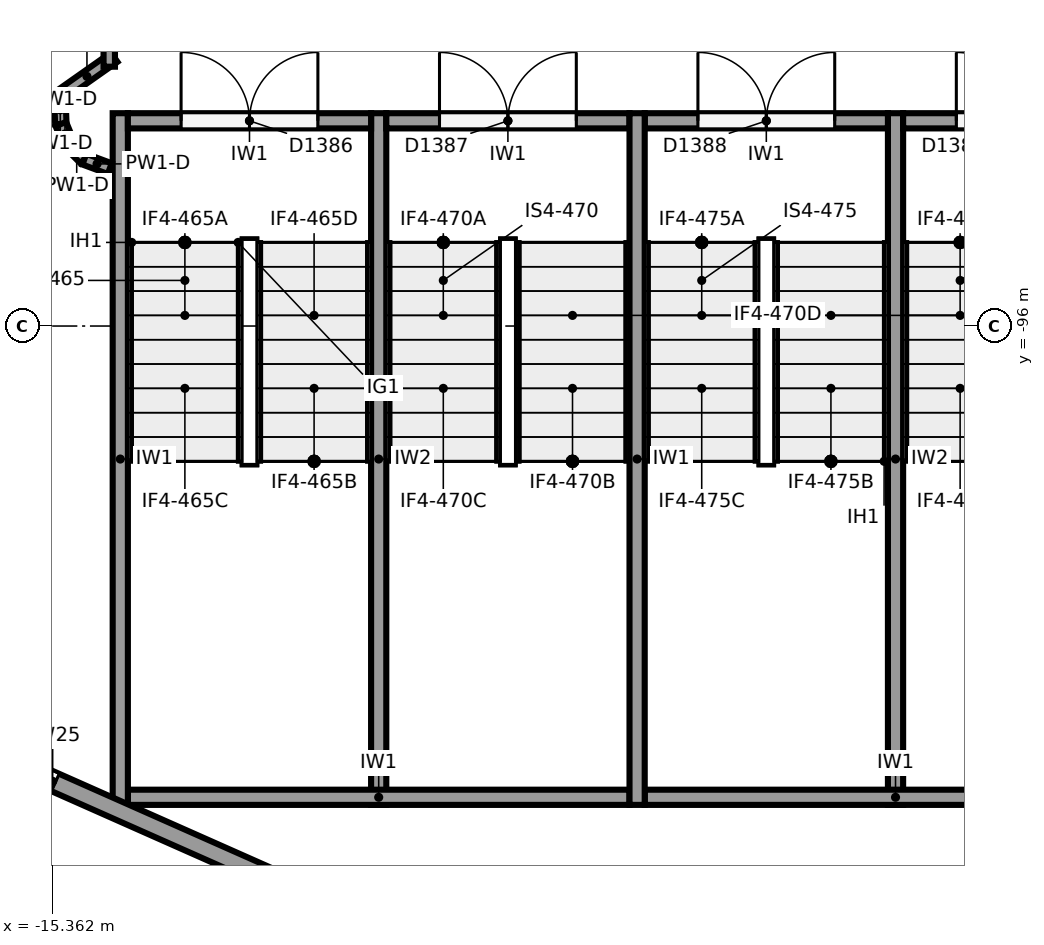
"""IFC4 building model, lengths in metres.
Left out: names, types, materials, properties, quantities, classifications, styles, units other than length and angle.
Written with IfcOpenShell. Run it as: python <this file> out.ifc"""

import sys

from ifc_helpers import new_model, si_unit, direction, frame, frame_2d, origin, place, context, subcontext, project, spatial, rectangle, extrude, element, fill, save


model = new_model("IFC4")
c1 = context("Model", 3, precision=1e-05, world=origin(), true_north=direction((0.0, 1.0)))
c2 = subcontext(c1, "Body", "Model", "MODEL_VIEW")
j1 = project(units=[si_unit("LENGTHUNIT", "METRE"), si_unit("PLANEANGLEUNIT", "RADIAN")], contexts=[c1])
p1 = place(None, origin())
s1 = spatial("IfcSite", under=j1, at=p1, CompositionType="ELEMENT")
p2 = place(p1, origin())
s2 = spatial("IfcBuilding", under=s1, at=p2, CompositionType="ELEMENT")
p3 = place(p2, frame((0.0, 0.0, 18.0)))
s3 = spatial("IfcBuildingStorey", under=s2, at=p3, CompositionType="ELEMENT", Elevation=18.0)
p4 = place(p3, frame((-8.123, -105.198, 0.0), z_axis=(0.0, 0.0, 1.0), x_axis=(-0.914138897099, 0.405401130748, 0.0)))
e1 = element("IfcWall", 1, at=p4, inside=s3, PredefinedType="SOLIDWALL", context=c2, shape_type="SweptSolid", body=[
    extrude(rectangle(XDim=15.824, YDim=0.25, at=frame_2d((7.912, 0.0))), origin(), (0.0, 0.0, 1.0), 4.3),
])
p5 = place(p4, frame((14.174, 0.0, 1.0)))
e2 = element("IfcOpeningElement", 2, at=p5, cuts=e1, PredefinedType="OPENING", context=c2, shape_type="SweptSolid", body=[
    extrude(rectangle(XDim=0.9, YDim=3.25, at=frame_2d((0.45, 1.625))), frame((0.0, 0.135, 0.0), z_axis=(0.0, -1.0, 0.0), x_axis=(1.0, 0.0, 0.0)), (0.0, 0.0, 1.0), 0.27),
])
p6 = place(p4, frame((12.074, 0.0, 1.0)))
e3 = element("IfcOpeningElement", 3, at=p6, cuts=e1, PredefinedType="OPENING", context=c2, shape_type="SweptSolid", body=[
    extrude(rectangle(XDim=0.9, YDim=3.25, at=frame_2d((0.45, 1.625))), frame((0.0, 0.135, 0.0), z_axis=(0.0, -1.0, 0.0), x_axis=(1.0, 0.0, 0.0)), (0.0, 0.0, 1.0), 0.27),
])
p7 = place(p4, frame((9.974, 0.0, 1.0)))
e4 = element("IfcOpeningElement", 4, at=p7, cuts=e1, PredefinedType="OPENING", context=c2, shape_type="SweptSolid", body=[
    extrude(rectangle(XDim=0.9, YDim=3.25, at=frame_2d((0.45, 1.625))), frame((0.0, 0.135, 0.0), z_axis=(0.0, -1.0, 0.0), x_axis=(1.0, 0.0, 0.0)), (0.0, 0.0, 1.0), 0.27),
])
p8 = place(p4, frame((7.874, 0.0, 1.0)))
e5 = element("IfcOpeningElement", 5, at=p8, cuts=e1, PredefinedType="OPENING", context=c2, shape_type="SweptSolid", body=[
    extrude(rectangle(XDim=0.9, YDim=3.25, at=frame_2d((0.45, 1.625))), frame((0.0, 0.135, 0.0), z_axis=(0.0, -1.0, 0.0), x_axis=(1.0, 0.0, 0.0)), (0.0, 0.0, 1.0), 0.27),
])
p9 = place(p3, frame((7.256, -98.782, 0.0), z_axis=(0.0, 0.0, 1.0), x_axis=(-0.914136361455, -0.405406848322, 0.0)))
e6 = element("IfcWall", 6, at=p9, inside=s3, PredefinedType="SOLIDWALL", context=c2, shape_type="SweptSolid", body=[
    extrude(rectangle(XDim=15.824, YDim=0.25, at=frame_2d((7.912, 0.0))), origin(), (0.0, 0.0, 1.0), 4.3),
])
p10 = place(p9, frame((0.75, 0.0, 1.0)))
e7 = element("IfcOpeningElement", 7, at=p10, cuts=e6, PredefinedType="OPENING", context=c2, shape_type="SweptSolid", body=[
    extrude(rectangle(XDim=0.9, YDim=3.25, at=frame_2d((0.45, 1.625))), frame((0.0, 0.135, 0.0), z_axis=(0.0, -1.0, 0.0), x_axis=(1.0, 0.0, 0.0)), (0.0, 0.0, 1.0), 0.27),
])
p11 = place(p9, frame((2.85, 0.0, 1.0)))
e8 = element("IfcOpeningElement", 8, at=p11, cuts=e6, PredefinedType="OPENING", context=c2, shape_type="SweptSolid", body=[
    extrude(rectangle(XDim=0.9, YDim=3.25, at=frame_2d((0.45, 1.625))), frame((0.0, 0.135, 0.0), z_axis=(0.0, -1.0, 0.0), x_axis=(1.0, 0.0, 0.0)), (0.0, 0.0, 1.0), 0.27),
])
p12 = place(p9, frame((4.95, 0.0, 1.0)))
e9 = element("IfcOpeningElement", 9, at=p12, cuts=e6, PredefinedType="OPENING", context=c2, shape_type="SweptSolid", body=[
    extrude(rectangle(XDim=0.9, YDim=3.25, at=frame_2d((0.45, 1.625))), frame((0.0, 0.135, 0.0), z_axis=(0.0, -1.0, 0.0), x_axis=(1.0, 0.0, 0.0)), (0.0, 0.0, 1.0), 0.27),
])
p13 = place(p9, frame((7.05, 0.0, 1.0)))
e10 = element("IfcOpeningElement", 10, at=p13, cuts=e6, PredefinedType="OPENING", context=c2, shape_type="SweptSolid", body=[
    extrude(rectangle(XDim=0.9, YDim=3.25, at=frame_2d((0.45, 1.625))), frame((0.0, 0.135, 0.0), z_axis=(0.0, -1.0, 0.0), x_axis=(1.0, 0.0, 0.0)), (0.0, 0.0, 1.0), 0.27),
])
for number, where, z_axis, x_axis in (
    (11, (-14.467, -102.3, 0.0), (0.0, 0.0, 1.0), (0.0, 1.0, 0.0)),
    (12, (-7.667, -102.3, 0.0), (0.0, 0.0, 1.0), (0.0, 1.0, 0.0)),
):
    element("IfcWall", number, at=place(p3, frame(where, z_axis=z_axis, x_axis=x_axis)), inside=s3, PredefinedType="SHEAR", context=c2, shape_type="SweptSolid", body=[
        extrude(rectangle(XDim=9.1, YDim=0.2, at=frame_2d((4.55, 0.0))), origin(), (0.0, 0.0, 1.0), 5.6),
    ])
p14 = place(p3, frame((-14.367, -102.2, 0.0), z_axis=(0.0, 0.0, 1.0), x_axis=(1.0, 0.0, 0.0)))
e13 = element("IfcWall", 13, at=p14, inside=s3, PredefinedType="SHEAR", context=c2, shape_type="SweptSolid", body=[
    extrude(rectangle(XDim=6.6, YDim=0.2, at=frame_2d((3.3, 0.0))), origin(), (0.0, 0.0, 1.0), 5.6),
])
p15 = place(p3, frame((-7.567, -102.2, 0.0), z_axis=(0.0, 0.0, 1.0), x_axis=(1.0, 0.0, 0.0)))
e14 = element("IfcWall", 14, at=p15, inside=s3, PredefinedType="SHEAR", context=c2, shape_type="SweptSolid", body=[
    extrude(rectangle(XDim=6.6, YDim=0.2, at=frame_2d((3.3, 0.0))), origin(), (0.0, 0.0, 1.0), 5.6),
])
for number, where, z_axis, x_axis in (
    (15, (-11.067, -102.3, 0.0), (0.0, 0.0, 1.0), (0.0, 1.0, 0.0)),
    (16, (-4.267, -102.3, 0.0), (0.0, 0.0, 1.0), (0.0, 1.0, 0.0)),
):
    element("IfcWall", number, at=place(p3, frame(where, z_axis=z_axis, x_axis=x_axis)), inside=s3, PredefinedType="SHEAR", context=c2, shape_type="SweptSolid", body=[
        extrude(rectangle(XDim=9.1, YDim=0.2, at=frame_2d((4.55, 0.0))), origin(), (0.0, 0.0, 1.0), 5.6),
    ])
p16 = place(p3, frame((-14.367, -93.3, 0.0), z_axis=(0.0, 0.0, 1.0), x_axis=(1.0, 0.0, 0.0)))
e17 = element("IfcWall", 17, at=p16, inside=s3, PredefinedType="SHEAR", context=c2, shape_type="SweptSolid", body=[
    extrude(rectangle(XDim=3.2, YDim=0.2, at=frame_2d((1.6, 0.0))), origin(), (0.0, 0.0, 1.0), 5.6),
])
p17 = place(p16, frame((0.7, 0.0, 0.0)))
e18 = element("IfcOpeningElement", 18, at=p17, cuts=e17, PredefinedType="OPENING", context=c2, shape_type="SweptSolid", body=[
    extrude(rectangle(XDim=1.8, YDim=2.1, at=frame_2d((0.9, 1.05))), frame((0.0, 0.11, 0.0), z_axis=(0.0, -1.0, 0.0), x_axis=(1.0, 0.0, 0.0)), (0.0, 0.0, 1.0), 0.22),
])
p18 = place(p3, frame((-10.967, -93.3, 0.0), z_axis=(0.0, 0.0, 1.0), x_axis=(1.0, 0.0, 0.0)))
e19 = element("IfcWall", 19, at=p18, inside=s3, PredefinedType="SHEAR", context=c2, shape_type="SweptSolid", body=[
    extrude(rectangle(XDim=3.2, YDim=0.2, at=frame_2d((1.6, 0.0))), origin(), (0.0, 0.0, 1.0), 5.6),
])
p19 = place(p18, frame((0.7, 0.0, 0.0)))
e20 = element("IfcOpeningElement", 20, at=p19, cuts=e19, PredefinedType="OPENING", context=c2, shape_type="SweptSolid", body=[
    extrude(rectangle(XDim=1.8, YDim=2.1, at=frame_2d((0.9, 1.05))), frame((0.0, 0.11, 0.0), z_axis=(0.0, -1.0, 0.0), x_axis=(1.0, 0.0, 0.0)), (0.0, 0.0, 1.0), 0.22),
])
p20 = place(p3, frame((-7.567, -93.3, 0.0), z_axis=(0.0, 0.0, 1.0), x_axis=(1.0, 0.0, 0.0)))
e21 = element("IfcWall", 21, at=p20, inside=s3, PredefinedType="SHEAR", context=c2, shape_type="SweptSolid", body=[
    extrude(rectangle(XDim=3.2, YDim=0.2, at=frame_2d((1.6, 0.0))), origin(), (0.0, 0.0, 1.0), 5.6),
])
p21 = place(p20, frame((0.7, 0.0, 0.0)))
e22 = element("IfcOpeningElement", 22, at=p21, cuts=e21, PredefinedType="OPENING", context=c2, shape_type="SweptSolid", body=[
    extrude(rectangle(XDim=1.8, YDim=2.1, at=frame_2d((0.9, 1.05))), frame((0.0, 0.11, 0.0), z_axis=(0.0, -1.0, 0.0), x_axis=(1.0, 0.0, 0.0)), (0.0, 0.0, 1.0), 0.22),
])
p22 = place(p3, frame((-4.167, -93.3, 0.0), z_axis=(0.0, 0.0, 1.0), x_axis=(1.0, 0.0, 0.0)))
e23 = element("IfcWall", 23, at=p22, inside=s3, PredefinedType="SHEAR", context=c2, shape_type="SweptSolid", body=[
    extrude(rectangle(XDim=3.2, YDim=0.2, at=frame_2d((1.6, 0.0))), origin(), (0.0, 0.0, 1.0), 5.6),
])
p23 = place(p22, frame((0.7, 0.0, 0.0)))
e24 = element("IfcOpeningElement", 24, at=p23, cuts=e23, PredefinedType="OPENING", context=c2, shape_type="SweptSolid", body=[
    extrude(rectangle(XDim=1.8, YDim=2.1, at=frame_2d((0.9, 1.05))), frame((0.0, 0.11, 0.0), z_axis=(0.0, -1.0, 0.0), x_axis=(1.0, 0.0, 0.0)), (0.0, 0.0, 1.0), 0.22),
])
p24 = place(p3, frame((-14.547, -92.464, 0.0), z_axis=(0.0, 0.0, 1.0), x_axis=(-0.817670329912, -0.57568674779, 0.0)))
e25 = element("IfcWall", 25, at=p24, inside=s3, PredefinedType="PARTITIONING", context=c2, shape_type="SweptSolid", body=[
    extrude(rectangle(XDim=0.876, YDim=0.15, at=frame_2d((0.438, 0.0))), origin(), (0.0, 0.0, 1.0), 3.115),
])
p25 = place(p3, frame((-15.263, -92.968, 0.0), z_axis=(0.0, 0.0, 1.0), x_axis=(0.039007374993, -0.999238922729, 0.0)))
e26 = element("IfcWall", 26, at=p25, inside=s3, PredefinedType="PARTITIONING", context=c2, shape_type="SweptSolid", body=[
    extrude(rectangle(XDim=0.375, YDim=0.15, at=frame_2d((0.188, 0.0))), origin(), (0.0, 0.0, 1.0), 3.115),
])
p26 = place(p3, frame((-15.249, -93.343, 0.0), z_axis=(0.0, 0.0, 1.0), x_axis=(0.382275228123, -0.924048510611, 0.0)))
e27 = element("IfcWall", 27, at=p26, inside=s3, PredefinedType="PARTITIONING", context=c2, shape_type="SweptSolid", body=[
    extrude(rectangle(XDim=0.282, YDim=0.15, at=frame_2d((0.141, 0.0))), origin(), (0.0, 0.0, 1.0), 3.115),
])
p27 = place(p3, frame((-15.141, -93.604, 0.0), z_axis=(0.0, 0.0, 1.0), x_axis=(0.707106781187, -0.707106781187, 0.0)))
e28 = element("IfcWall", 28, at=p27, inside=s3, PredefinedType="PARTITIONING", context=c2, shape_type="SweptSolid", body=[
    extrude(rectangle(XDim=0.285, YDim=0.15, at=frame_2d((0.143, 0.0))), origin(), (0.0, 0.0, 1.0), 3.115),
])
p28 = place(p3, frame((-14.939, -93.805, 0.0), z_axis=(0.0, 0.0, 1.0), x_axis=(0.937897537761, -0.346912393353, 0.0)))
e29 = element("IfcWall", 29, at=p28, inside=s3, PredefinedType="PARTITIONING", context=c2, shape_type="SweptSolid", body=[
    extrude(rectangle(XDim=0.356, YDim=0.15, at=frame_2d((0.178, 0.0))), origin(), (0.0, 0.0, 1.0), 3.115),
])
p29 = place(p3, frame((-14.612, -86.155, 0.0), z_axis=(0.0, 0.0, 1.0), x_axis=(0.0, -1.0, 0.0)))
e30 = element("IfcWall", 30, at=p29, inside=s3, PredefinedType="PARTITIONING", context=c2, shape_type="SweptSolid", body=[
    extrude(rectangle(XDim=6.433, YDim=0.15, at=frame_2d((3.217, 0.0))), origin(), (0.0, 0.0, 1.0), 3.115),
])
p30 = place(p29, frame((1.95, 0.0, 0.0)))
e31 = element("IfcOpeningElement", 31, at=p30, cuts=e30, PredefinedType="OPENING", context=c2, shape_type="SweptSolid", body=[
    extrude(rectangle(XDim=1.8, YDim=2.1, at=frame_2d((0.9, 1.05))), frame((0.0, 0.085, 0.0), z_axis=(0.0, -1.0, 0.0), x_axis=(1.0, 0.0, 0.0)), (0.0, 0.0, 1.0), 0.17),
])
p31 = place(p8, origin())
e32 = element("IfcWindow", 32, at=p31, inside=s3, PartitioningType="SINGLE_PANEL", PredefinedType="WINDOW", context=c2, shape_type="SweptSolid", body=[
    extrude(rectangle(XDim=0.9, YDim=3.25, at=frame_2d((0.45, 1.625))), frame((0.0, 0.03, 0.0), z_axis=(0.0, -1.0, 0.0), x_axis=(1.0, 0.0, 0.0)), (0.0, 0.0, 1.0), 0.06),
])
fill(e5, e32)
p32 = place(p17, origin())
e33 = element("IfcDoor", 33, at=p32, inside=s3, OperationType="DOUBLE_DOOR_SINGLE_SWING", PredefinedType="DOOR", context=c2, shape_type="SweptSolid", body=[
    extrude(rectangle(XDim=1.8, YDim=2.1, at=frame_2d((0.9, 1.05))), frame((0.0, 0.025, 0.0), z_axis=(0.0, -1.0, 0.0), x_axis=(1.0, 0.0, 0.0)), (0.0, 0.0, 1.0), 0.05),
])
fill(e18, e33)
p33 = place(p19, origin())
e34 = element("IfcDoor", 34, at=p33, inside=s3, OperationType="DOUBLE_DOOR_SINGLE_SWING", PredefinedType="DOOR", context=c2, shape_type="SweptSolid", body=[
    extrude(rectangle(XDim=1.8, YDim=2.1, at=frame_2d((0.9, 1.05))), frame((0.0, 0.025, 0.0), z_axis=(0.0, -1.0, 0.0), x_axis=(1.0, 0.0, 0.0)), (0.0, 0.0, 1.0), 0.05),
])
fill(e20, e34)
p34 = place(p21, origin())
e35 = element("IfcDoor", 35, at=p34, inside=s3, OperationType="DOUBLE_DOOR_SINGLE_SWING", PredefinedType="DOOR", context=c2, shape_type="SweptSolid", body=[
    extrude(rectangle(XDim=1.8, YDim=2.1, at=frame_2d((0.9, 1.05))), frame((0.0, 0.025, 0.0), z_axis=(0.0, -1.0, 0.0), x_axis=(1.0, 0.0, 0.0)), (0.0, 0.0, 1.0), 0.05),
])
fill(e22, e35)
p35 = place(p23, origin())
e36 = element("IfcDoor", 36, at=p35, inside=s3, OperationType="DOUBLE_DOOR_SINGLE_SWING", PredefinedType="DOOR", context=c2, shape_type="SweptSolid", body=[
    extrude(rectangle(XDim=1.8, YDim=2.1, at=frame_2d((0.9, 1.05))), frame((0.0, 0.025, 0.0), z_axis=(0.0, -1.0, 0.0), x_axis=(1.0, 0.0, 0.0)), (0.0, 0.0, 1.0), 0.05),
])
fill(e24, e36)
save(model, sys.argv[1])
